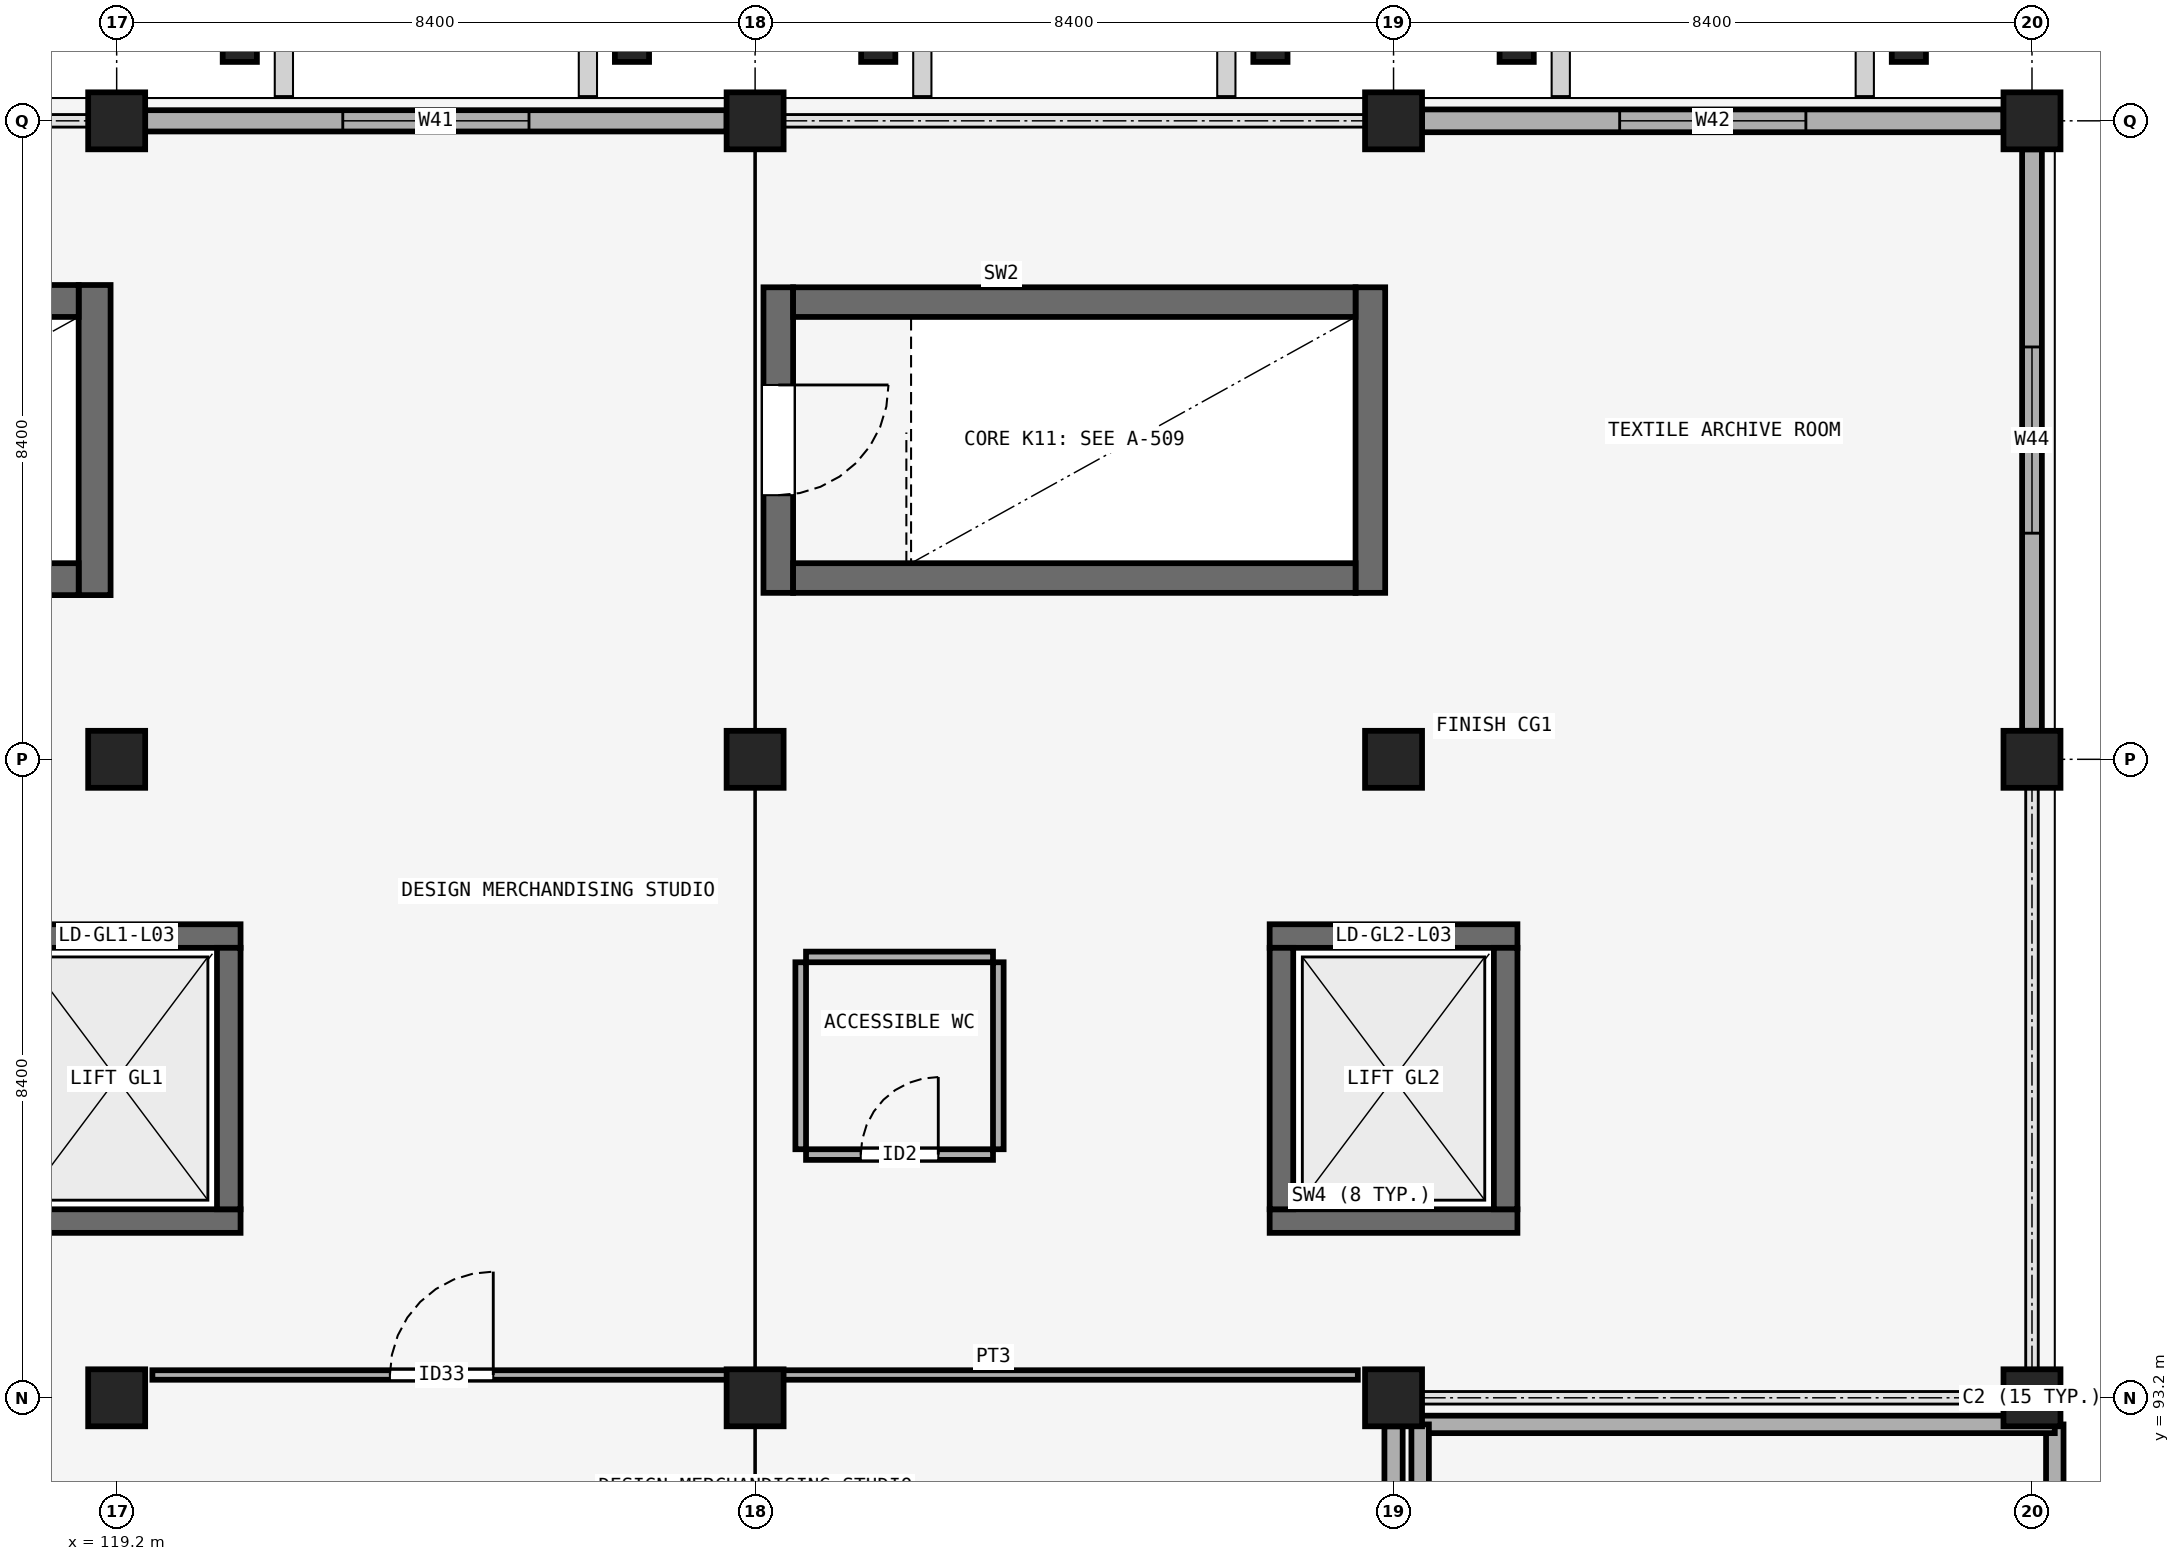
"""IFC4 building model, lengths in metres.
Left out: names, types, materials, properties, quantities, classifications, styles, units other than length and angle.
Written with IfcOpenShell. Run it as: python <this file> out.ifc"""

import sys

from ifc_helpers import new_model, si_unit, direction, frame, frame_2d, origin, origin_2d, place, context, subcontext, project, spatial, rectangle, extrude, element, fill, save


model = new_model("IFC4")
c1 = context("Model", 3, precision=1e-05, world=origin(), true_north=direction((0.0, 1.0)))
c2 = subcontext(c1, "Body", "Model", "MODEL_VIEW")
j1 = project(units=[si_unit("LENGTHUNIT", "METRE"), si_unit("PLANEANGLEUNIT", "RADIAN")], contexts=[c1])
p1 = place(None, origin())
s1 = spatial("IfcSite", under=j1, at=p1, CompositionType="ELEMENT")
p2 = place(p1, origin())
s2 = spatial("IfcBuilding", under=s1, at=p2, CompositionType="ELEMENT")
p3 = place(p2, frame((0.0, 0.0, 14.4)))
s3 = spatial("IfcBuildingStorey", under=s2, at=p3, CompositionType="ELEMENT", Elevation=14.4)
for number, where, z_axis, x_axis in (
    (1, (119.2, 93.2, 0.0), (0.0, 0.0, 1.0), (1.0, 0.0, 0.0)),
    (2, (127.6, 93.2, 0.0), (0.0, 0.0, 1.0), (1.0, 0.0, 0.0)),
    (3, (136.0, 93.2, 0.0), (0.0, 0.0, 1.0), (1.0, 0.0, 0.0)),
    (4, (144.4, 93.2, 0.0), (0.0, 0.0, 1.0), (1.0, 0.0, 0.0)),
    (5, (119.2, 101.6, 0.0), (0.0, 0.0, 1.0), (1.0, 0.0, 0.0)),
    (6, (127.6, 101.6, 0.0), (0.0, 0.0, 1.0), (1.0, 0.0, 0.0)),
    (7, (136.0, 101.6, 0.0), (0.0, 0.0, 1.0), (1.0, 0.0, 0.0)),
    (8, (144.4, 101.6, 0.0), (0.0, 0.0, 1.0), (1.0, 0.0, 0.0)),
    (9, (119.2, 110.0, 0.0), (0.0, 0.0, 1.0), (1.0, 0.0, 0.0)),
    (10, (127.6, 110.0, 0.0), (0.0, 0.0, 1.0), (1.0, 0.0, 0.0)),
    (11, (136.0, 110.0, 0.0), (0.0, 0.0, 1.0), (1.0, 0.0, 0.0)),
    (12, (144.4, 110.0, 0.0), (0.0, 0.0, 1.0), (1.0, 0.0, 0.0)),
):
    element("IfcColumn", number, at=place(p3, frame(where, z_axis=z_axis, x_axis=x_axis)), inside=s3, PredefinedType="COLUMN", context=c2, shape_type="SweptSolid", body=[
        extrude(rectangle(XDim=0.75, YDim=0.75, at=origin_2d()), origin(), (0.0, 0.0, 1.0), 4.5),
    ])
for number, where, z_axis, x_axis in (
    (13, (120.82, 111.05, 0.0), (0.0, 0.0, 1.0), (1.0, 0.0, 0.0)),
    (14, (125.98, 111.05, 0.0), (0.0, 0.0, 1.0), (1.0, 0.0, 0.0)),
    (15, (129.22, 111.05, 0.0), (0.0, 0.0, 1.0), (1.0, 0.0, 0.0)),
    (16, (134.38, 111.05, 0.0), (0.0, 0.0, 1.0), (1.0, 0.0, 0.0)),
    (17, (137.62, 111.05, 0.0), (0.0, 0.0, 1.0), (1.0, 0.0, 0.0)),
    (18, (142.78, 111.05, 0.0), (0.0, 0.0, 1.0), (1.0, 0.0, 0.0)),
):
    element("IfcColumn", number, at=place(p3, frame(where, z_axis=z_axis, x_axis=x_axis)), inside=s3, PredefinedType="PILASTER", context=c2, shape_type="SweptSolid", body=[
        extrude(rectangle(XDim=0.45, YDim=0.55, at=origin_2d()), origin(), (0.0, 0.0, 1.0), 4.5),
    ])
p4 = place(p3, frame((119.575, 110.0, 0.0), z_axis=(0.0, 0.0, 1.0), x_axis=(1.0, 0.0, 0.0)))
e19 = element("IfcWall", 19, at=p4, inside=s3, PredefinedType="SOLIDWALL", context=c2, shape_type="SweptSolid", body=[
    extrude(rectangle(XDim=7.65, YDim=0.28, at=frame_2d((3.825, 0.0))), origin(), (0.0, 0.0, 1.0), 3.49),
])
p5 = place(p4, frame((2.6, 0.0, 0.95)))
e20 = element("IfcOpeningElement", 20, at=p5, cuts=e19, PredefinedType="OPENING", context=c2, shape_type="SweptSolid", body=[
    extrude(rectangle(XDim=2.45, YDim=1.35, at=frame_2d((1.225, 0.675))), frame((0.0, 0.15, 0.0), z_axis=(0.0, -1.0, 0.0), x_axis=(1.0, 0.0, 0.0)), (0.0, 0.0, 1.0), 0.3),
])
p6 = place(p3, frame((136.375, 110.0, 0.0), z_axis=(0.0, 0.0, 1.0), x_axis=(1.0, 0.0, 0.0)))
e21 = element("IfcWall", 21, at=p6, inside=s3, PredefinedType="SOLIDWALL", context=c2, shape_type="SweptSolid", body=[
    extrude(rectangle(XDim=7.65, YDim=0.3, at=frame_2d((3.825, 0.0))), origin(), (0.0, 0.0, 1.0), 3.49),
])
p7 = place(p6, frame((2.6, 0.0, 0.95)))
e22 = element("IfcOpeningElement", 22, at=p7, cuts=e21, PredefinedType="OPENING", context=c2, shape_type="SweptSolid", body=[
    extrude(rectangle(XDim=2.45, YDim=1.6, at=frame_2d((1.225, 0.8))), frame((0.0, 0.16, 0.0), z_axis=(0.0, -1.0, 0.0), x_axis=(1.0, 0.0, 0.0)), (0.0, 0.0, 1.0), 0.32),
])
p8 = place(p3, frame((136.0, 85.175, 0.0), z_axis=(0.0, 0.0, 1.0), x_axis=(0.0, 1.0, 0.0)))
e23 = element("IfcWall", 23, at=p8, inside=s3, PredefinedType="SOLIDWALL", context=c2, shape_type="SweptSolid", body=[
    extrude(rectangle(XDim=7.65, YDim=0.24, at=frame_2d((3.825, 0.0))), origin(), (0.0, 0.0, 1.0), 3.49),
])
p9 = place(p8, frame((2.6, 0.0, 0.95)))
e24 = element("IfcOpeningElement", 24, at=p9, cuts=e23, PredefinedType="OPENING", context=c2, shape_type="SweptSolid", body=[
    extrude(rectangle(XDim=2.45, YDim=1.85, at=frame_2d((1.225, 0.925))), frame((0.0, 0.13, 0.0), z_axis=(0.0, -1.0, 0.0), x_axis=(1.0, 0.0, 0.0)), (0.0, 0.0, 1.0), 0.26),
])
p10 = place(p3, frame((144.4, 101.975, 0.0), z_axis=(0.0, 0.0, 1.0), x_axis=(0.0, 1.0, 0.0)))
e25 = element("IfcWall", 25, at=p10, inside=s3, PredefinedType="SOLIDWALL", context=c2, shape_type="SweptSolid", body=[
    extrude(rectangle(XDim=7.65, YDim=0.26, at=frame_2d((3.825, 0.0))), origin(), (0.0, 0.0, 1.0), 3.49),
])
p11 = place(p10, frame((2.6, 0.0, 0.95)))
e26 = element("IfcOpeningElement", 26, at=p11, cuts=e25, PredefinedType="OPENING", context=c2, shape_type="SweptSolid", body=[
    extrude(rectangle(XDim=2.45, YDim=2.1, at=frame_2d((1.225, 1.05))), frame((0.0, 0.14, 0.0), z_axis=(0.0, -1.0, 0.0), x_axis=(1.0, 0.0, 0.0)), (0.0, 0.0, 1.0), 0.28),
])
p12 = place(p3, frame((144.7, 84.5, 0.0), z_axis=(0.0, 0.0, 1.0), x_axis=(0.0, 1.0, 0.0)))
e27 = element("IfcWall", 27, at=p12, inside=s3, PredefinedType="PARAPET", context=c2, shape_type="SweptSolid", body=[
    extrude(rectangle(XDim=8.35, YDim=0.23, at=frame_2d((4.175, 0.0))), origin(), (0.0, 0.0, 1.0), 0.95),
])
p13 = place(p3, frame((144.7, 92.85, 0.0), z_axis=(0.0, 0.0, 1.0), x_axis=(-1.0, 0.0, 0.0)))
e28 = element("IfcWall", 28, at=p13, inside=s3, PredefinedType="PARAPET", context=c2, shape_type="SweptSolid", body=[
    extrude(rectangle(XDim=8.35, YDim=0.23, at=frame_2d((4.175, 0.0))), origin(), (0.0, 0.0, 1.0), 0.95),
])
p14 = place(p3, frame((136.35, 92.85, 0.0), z_axis=(0.0, 0.0, 1.0), x_axis=(0.0, -1.0, 0.0)))
e29 = element("IfcWall", 29, at=p14, inside=s3, PredefinedType="PARAPET", context=c2, shape_type="SweptSolid", body=[
    extrude(rectangle(XDim=8.35, YDim=0.23, at=frame_2d((4.175, 0.0))), origin(), (0.0, 0.0, 1.0), 0.95),
])
p15 = place(p3, frame((118.91, 103.76, 0.0), z_axis=(0.0, 0.0, 1.0), x_axis=(0.0, 1.0, 0.0)))
e30 = element("IfcWall", 30, at=p15, inside=s3, PredefinedType="SHEAR", context=c2, shape_type="SweptSolid", body=[
    extrude(rectangle(XDim=4.08, YDim=0.42, at=frame_2d((2.04, 0.0))), origin(), (0.0, 0.0, 1.0), 4.24),
])
for number, where, z_axis, x_axis in (
    (31, (111.3, 103.97, 0.0), (0.0, 0.0, 1.0), (1.0, 0.0, 0.0)),
    (32, (111.3, 107.63, 0.0), (0.0, 0.0, 1.0), (1.0, 0.0, 0.0)),
):
    element("IfcWall", number, at=place(p3, frame(where, z_axis=z_axis, x_axis=x_axis)), inside=s3, PredefinedType="SHEAR", context=c2, shape_type="SweptSolid", body=[
        extrude(rectangle(XDim=7.4, YDim=0.42, at=frame_2d((3.7, 0.0))), origin(), (0.0, 0.0, 1.0), 4.24),
    ])
p16 = place(p3, frame((127.905, 107.81, 0.0), z_axis=(0.0, 0.0, 1.0), x_axis=(0.0, -1.0, 0.0)))
e33 = element("IfcWall", 33, at=p16, inside=s3, PredefinedType="SHEAR", context=c2, shape_type="SweptSolid", body=[
    extrude(rectangle(XDim=4.02, YDim=0.39, at=frame_2d((2.01, 0.0))), origin(), (0.0, 0.0, 1.0), 4.24),
])
p17 = place(p16, frame((1.285, 0.0, 0.0)))
e34 = element("IfcOpeningElement", 34, at=p17, cuts=e33, PredefinedType="OPENING", context=c2, shape_type="SweptSolid", body=[
    extrude(rectangle(XDim=1.45, YDim=2.2, at=frame_2d((0.725, 1.1))), frame((0.0, 0.205, 0.0), z_axis=(0.0, -1.0, 0.0), x_axis=(1.0, 0.0, 0.0)), (0.0, 0.0, 1.0), 0.41),
])
p18 = place(p3, frame((135.695, 103.79, 0.0), z_axis=(0.0, 0.0, 1.0), x_axis=(0.0, 1.0, 0.0)))
e35 = element("IfcWall", 35, at=p18, inside=s3, PredefinedType="SHEAR", context=c2, shape_type="SweptSolid", body=[
    extrude(rectangle(XDim=4.02, YDim=0.39, at=frame_2d((2.01, 0.0))), origin(), (0.0, 0.0, 1.0), 4.24),
])
for number, where, z_axis, x_axis in (
    (36, (128.1, 103.985, 0.0), (0.0, 0.0, 1.0), (1.0, 0.0, 0.0)),
    (37, (128.1, 107.615, 0.0), (0.0, 0.0, 1.0), (1.0, 0.0, 0.0)),
):
    element("IfcWall", number, at=place(p3, frame(where, z_axis=z_axis, x_axis=x_axis)), inside=s3, PredefinedType="SHEAR", context=c2, shape_type="SweptSolid", body=[
        extrude(rectangle(XDim=7.4, YDim=0.39, at=frame_2d((3.7, 0.0))), origin(), (0.0, 0.0, 1.0), 4.24),
    ])
p19 = place(p3, frame((117.57, 95.525, 0.0), z_axis=(0.0, 0.0, 1.0), x_axis=(1.0, 0.0, 0.0)))
e38 = element("IfcWall", 38, at=p19, inside=s3, PredefinedType="SHEAR", context=c2, shape_type="SweptSolid", body=[
    extrude(rectangle(XDim=3.26, YDim=0.31, at=frame_2d((1.63, 0.0))), origin(), (0.0, 0.0, 1.0), 4.65),
])
p20 = place(p3, frame((117.57, 99.275, 0.0), z_axis=(0.0, 0.0, 1.0), x_axis=(1.0, 0.0, 0.0)))
e39 = element("IfcWall", 39, at=p20, inside=s3, PredefinedType="SHEAR", context=c2, shape_type="SweptSolid", body=[
    extrude(rectangle(XDim=3.26, YDim=0.31, at=frame_2d((1.63, 0.0))), origin(), (0.0, 0.0, 1.0), 4.65),
])
p21 = place(p20, frame((0.88, 0.0, 0.0)))
e40 = element("IfcOpeningElement", 40, at=p21, cuts=e39, PredefinedType="OPENING", context=c2, shape_type="SweptSolid", body=[
    extrude(rectangle(XDim=1.5, YDim=2.35, at=frame_2d((0.75, 1.175))), frame((0.0, 0.165, 0.0), z_axis=(0.0, -1.0, 0.0), x_axis=(1.0, 0.0, 0.0)), (0.0, 0.0, 1.0), 0.33),
])
p22 = place(p3, frame((120.675, 95.68, 0.0), z_axis=(0.0, 0.0, 1.0), x_axis=(0.0, 1.0, 0.0)))
e41 = element("IfcWall", 41, at=p22, inside=s3, PredefinedType="SHEAR", context=c2, shape_type="SweptSolid", body=[
    extrude(rectangle(XDim=3.44, YDim=0.31, at=frame_2d((1.72, 0.0))), origin(), (0.0, 0.0, 1.0), 4.65),
])
p23 = place(p3, frame((134.37, 95.525, 0.0), z_axis=(0.0, 0.0, 1.0), x_axis=(1.0, 0.0, 0.0)))
e42 = element("IfcWall", 42, at=p23, inside=s3, PredefinedType="SHEAR", context=c2, shape_type="SweptSolid", body=[
    extrude(rectangle(XDim=3.26, YDim=0.31, at=frame_2d((1.63, 0.0))), origin(), (0.0, 0.0, 1.0), 4.65),
])
p24 = place(p3, frame((134.37, 99.275, 0.0), z_axis=(0.0, 0.0, 1.0), x_axis=(1.0, 0.0, 0.0)))
e43 = element("IfcWall", 43, at=p24, inside=s3, PredefinedType="SHEAR", context=c2, shape_type="SweptSolid", body=[
    extrude(rectangle(XDim=3.26, YDim=0.31, at=frame_2d((1.63, 0.0))), origin(), (0.0, 0.0, 1.0), 4.65),
])
p25 = place(p24, frame((0.88, 0.0, 0.0)))
e44 = element("IfcOpeningElement", 44, at=p25, cuts=e43, PredefinedType="OPENING", context=c2, shape_type="SweptSolid", body=[
    extrude(rectangle(XDim=1.5, YDim=2.35, at=frame_2d((0.75, 1.175))), frame((0.0, 0.165, 0.0), z_axis=(0.0, -1.0, 0.0), x_axis=(1.0, 0.0, 0.0)), (0.0, 0.0, 1.0), 0.33),
])
for number, where, z_axis, x_axis in (
    (45, (134.525, 95.68, 0.0), (0.0, 0.0, 1.0), (0.0, 1.0, 0.0)),
    (46, (137.475, 95.68, 0.0), (0.0, 0.0, 1.0), (0.0, 1.0, 0.0)),
):
    element("IfcWall", number, at=place(p3, frame(where, z_axis=z_axis, x_axis=x_axis)), inside=s3, PredefinedType="SHEAR", context=c2, shape_type="SweptSolid", body=[
        extrude(rectangle(XDim=3.44, YDim=0.31, at=frame_2d((1.72, 0.0))), origin(), (0.0, 0.0, 1.0), 4.65),
    ])
p26 = place(p3, frame((128.27, 96.4, 0.0), z_axis=(0.0, 0.0, 1.0), x_axis=(1.0, 0.0, 0.0)))
e47 = element("IfcWall", 47, at=p26, inside=s3, PredefinedType="PARTITIONING", context=c2, shape_type="SweptSolid", body=[
    extrude(rectangle(XDim=2.46, YDim=0.14, at=frame_2d((1.23, 0.0))), origin(), (0.0, 0.0, 1.0), 4.2),
])
p27 = place(p26, frame((0.72, 0.0, 0.0)))
e48 = element("IfcOpeningElement", 48, at=p27, cuts=e47, PredefinedType="OPENING", context=c2, shape_type="SweptSolid", body=[
    extrude(rectangle(XDim=1.02, YDim=2.15, at=frame_2d((0.51, 1.075))), frame((0.0, 0.08, 0.0), z_axis=(0.0, -1.0, 0.0), x_axis=(1.0, 0.0, 0.0)), (0.0, 0.0, 1.0), 0.16),
])
for number, where, z_axis, x_axis in (
    (49, (128.27, 99.0, 0.0), (0.0, 0.0, 1.0), (1.0, 0.0, 0.0)),
    (50, (128.2, 96.47, 0.0), (0.0, 0.0, 1.0), (0.0, 1.0, 0.0)),
    (51, (130.8, 96.47, 0.0), (0.0, 0.0, 1.0), (0.0, 1.0, 0.0)),
):
    element("IfcWall", number, at=place(p3, frame(where, z_axis=z_axis, x_axis=x_axis)), inside=s3, PredefinedType="PARTITIONING", context=c2, shape_type="SweptSolid", body=[
        extrude(rectangle(XDim=2.46, YDim=0.14, at=frame_2d((1.23, 0.0))), origin(), (0.0, 0.0, 1.0), 4.2),
    ])
p28 = place(p3, frame((119.67, 93.5, 0.0), z_axis=(0.0, 0.0, 1.0), x_axis=(1.0, 0.0, 0.0)))
e52 = element("IfcWall", 52, at=p28, inside=s3, PredefinedType="PARTITIONING", context=c2, shape_type="SweptSolid", body=[
    extrude(rectangle(XDim=7.61, YDim=0.125, at=frame_2d((3.805, 0.0))), origin(), (0.0, 0.0, 1.0), 4.2),
])
p29 = place(p28, frame((3.125, 0.0, 0.0)))
e53 = element("IfcOpeningElement", 53, at=p29, cuts=e52, PredefinedType="OPENING", context=c2, shape_type="SweptSolid", body=[
    extrude(rectangle(XDim=1.36, YDim=2.34, at=frame_2d((0.68, 1.17))), frame((0.0, 0.073, 0.0), z_axis=(0.0, -1.0, 0.0), x_axis=(1.0, 0.0, 0.0)), (0.0, 0.0, 1.0), 0.145),
])
p30 = place(p3, frame((127.92, 93.5, 0.0), z_axis=(0.0, 0.0, 1.0), x_axis=(1.0, 0.0, 0.0)))
e54 = element("IfcWall", 54, at=p30, inside=s3, PredefinedType="PARTITIONING", context=c2, shape_type="SweptSolid", body=[
    extrude(rectangle(XDim=7.61, YDim=0.125, at=frame_2d((3.805, 0.0))), origin(), (0.0, 0.0, 1.0), 4.2),
])
p31 = place(p5, origin())
e55 = element("IfcWindow", 55, at=p31, inside=s3, PartitioningType="DOUBLE_PANEL_VERTICAL", PredefinedType="WINDOW", context=c2, shape_type="SweptSolid", body=[
    extrude(rectangle(XDim=2.45, YDim=1.35, at=frame_2d((1.225, 0.675))), frame((0.0, 0.03, 0.0), z_axis=(0.0, -1.0, 0.0), x_axis=(1.0, 0.0, 0.0)), (0.0, 0.0, 1.0), 0.06),
])
fill(e20, e55)
p32 = place(p7, origin())
e56 = element("IfcWindow", 56, at=p32, inside=s3, PartitioningType="DOUBLE_PANEL_VERTICAL", PredefinedType="WINDOW", context=c2, shape_type="SweptSolid", body=[
    extrude(rectangle(XDim=2.45, YDim=1.6, at=frame_2d((1.225, 0.8))), frame((0.0, 0.03, 0.0), z_axis=(0.0, -1.0, 0.0), x_axis=(1.0, 0.0, 0.0)), (0.0, 0.0, 1.0), 0.06),
])
fill(e22, e56)
p33 = place(p11, origin())
e57 = element("IfcWindow", 57, at=p33, inside=s3, PartitioningType="DOUBLE_PANEL_VERTICAL", PredefinedType="WINDOW", context=c2, shape_type="SweptSolid", body=[
    extrude(rectangle(XDim=2.45, YDim=2.1, at=frame_2d((1.225, 1.05))), frame((0.0, 0.03, 0.0), z_axis=(0.0, -1.0, 0.0), x_axis=(1.0, 0.0, 0.0)), (0.0, 0.0, 1.0), 0.06),
])
fill(e26, e57)
p34 = place(p17, origin())
e58 = element("IfcDoor", 58, at=p34, inside=s3, OperationType="SINGLE_SWING_LEFT", PredefinedType="DOOR", context=c2, shape_type="SweptSolid", body=[
    extrude(rectangle(XDim=1.45, YDim=2.2, at=frame_2d((0.725, 1.1))), frame((0.0, 0.025, 0.0), z_axis=(0.0, -1.0, 0.0), x_axis=(1.0, 0.0, 0.0)), (0.0, 0.0, 1.0), 0.05),
])
fill(e34, e58)
p35 = place(p21, origin())
e59 = element("IfcDoor", 59, at=p35, inside=s3, OperationType="SLIDING_TO_LEFT", PredefinedType="DOOR", context=c2, shape_type="SweptSolid", body=[
    extrude(rectangle(XDim=1.5, YDim=2.35, at=frame_2d((0.75, 1.175))), frame((0.0, 0.025, 0.0), z_axis=(0.0, -1.0, 0.0), x_axis=(1.0, 0.0, 0.0)), (0.0, 0.0, 1.0), 0.05),
])
fill(e40, e59)
p36 = place(p25, origin())
e60 = element("IfcDoor", 60, at=p36, inside=s3, OperationType="SLIDING_TO_LEFT", PredefinedType="DOOR", context=c2, shape_type="SweptSolid", body=[
    extrude(rectangle(XDim=1.5, YDim=2.35, at=frame_2d((0.75, 1.175))), frame((0.0, 0.025, 0.0), z_axis=(0.0, -1.0, 0.0), x_axis=(1.0, 0.0, 0.0)), (0.0, 0.0, 1.0), 0.05),
])
fill(e44, e60)
p37 = place(p27, origin())
e61 = element("IfcDoor", 61, at=p37, inside=s3, OperationType="SINGLE_SWING_RIGHT", PredefinedType="DOOR", context=c2, shape_type="SweptSolid", body=[
    extrude(rectangle(XDim=1.02, YDim=2.15, at=frame_2d((0.51, 1.075))), frame((0.0, 0.025, 0.0), z_axis=(0.0, -1.0, 0.0), x_axis=(1.0, 0.0, 0.0)), (0.0, 0.0, 1.0), 0.05),
])
fill(e48, e61)
p38 = place(p29, origin())
e62 = element("IfcDoor", 62, at=p38, inside=s3, OperationType="SINGLE_SWING_RIGHT", PredefinedType="DOOR", context=c2, shape_type="SweptSolid", body=[
    extrude(rectangle(XDim=1.36, YDim=2.34, at=frame_2d((0.68, 1.17))), frame((0.0, 0.025, 0.0), z_axis=(0.0, -1.0, 0.0), x_axis=(1.0, 0.0, 0.0)), (0.0, 0.0, 1.0), 0.05),
])
fill(e53, e62)
save(model, sys.argv[1])
